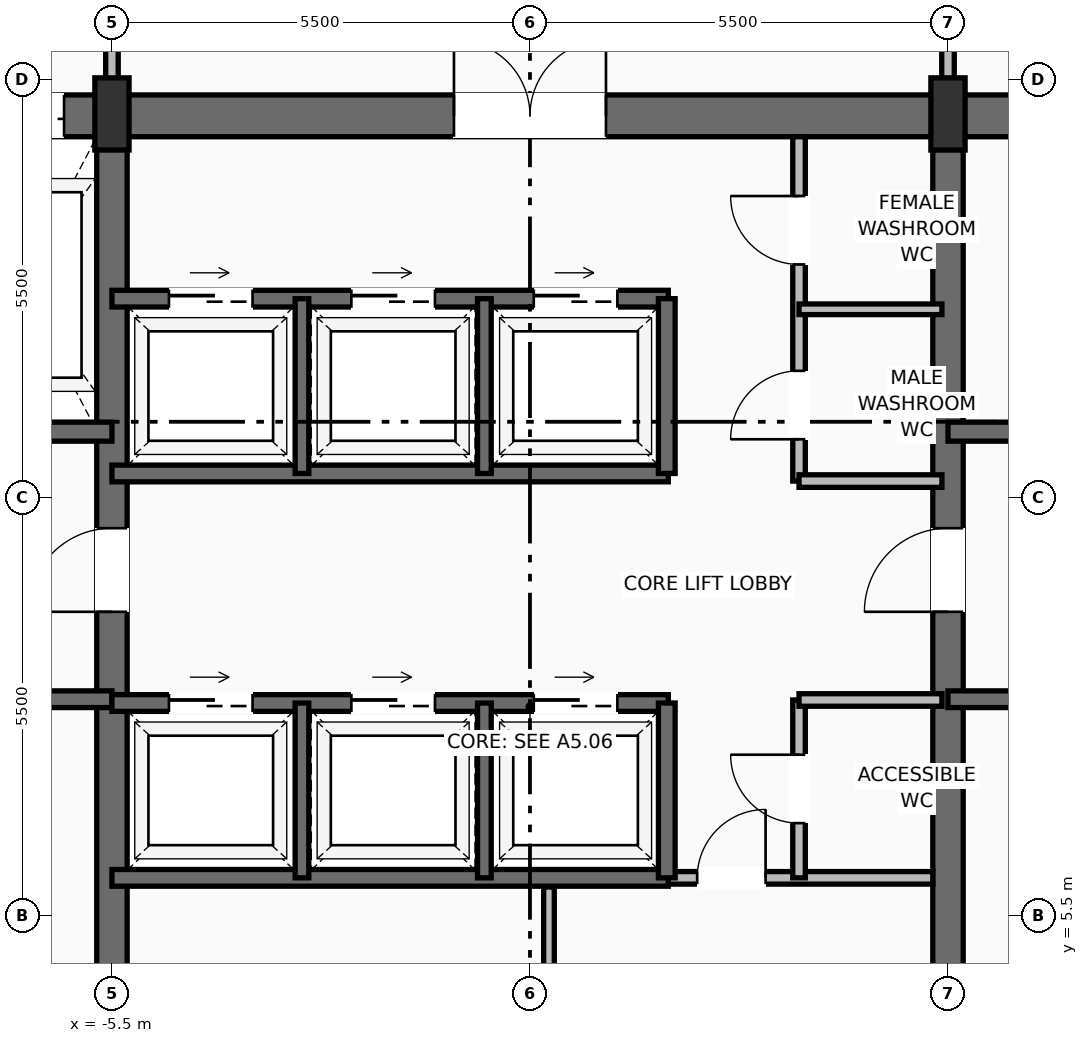
"""IFC4 building model, lengths in metres.
Left out: names, types, materials, properties, quantities, classifications, styles, units other than length and angle.
Written with IfcOpenShell. Run it as: python <this file> out.ifc"""

import sys

from ifc_helpers import new_model, si_unit, direction, frame, frame_2d, origin, origin_2d, place, context, subcontext, project, spatial, rectangle, extrude, source, transform, mapped, element, fill, save


model = new_model("IFC4")
c1 = context("Model", 3, precision=1e-05, world=origin(), true_north=direction((0.0, 1.0)))
c2 = subcontext(c1, "Body", "Model", "MODEL_VIEW")
j1 = project(units=[si_unit("LENGTHUNIT", "METRE"), si_unit("PLANEANGLEUNIT", "RADIAN")], contexts=[c1])
p1 = place(None, origin())
s1 = spatial("IfcSite", under=j1, at=p1, CompositionType="ELEMENT")
p2 = place(p1, origin())
s2 = spatial("IfcBuilding", under=s1, at=p2, CompositionType="ELEMENT")
p3 = place(p2, frame((0.0, 0.0, 215.4)))
s3 = spatial("IfcBuildingStorey", under=s2, at=p3, CompositionType="ELEMENT", Elevation=215.4)
p4 = place(p3, frame((-10.7, 16.025, 0.0), z_axis=(0.0, 0.0, 1.0), x_axis=(1.0, 0.0, 0.0)))
e1 = element("IfcWall", 1, at=p4, inside=s3, PredefinedType="SHEAR", context=c2, shape_type="SweptSolid", body=[
    extrude(rectangle(XDim=21.4, YDim=0.55, at=frame_2d((10.7, 0.0))), origin(), (0.0, 0.0, 1.0), 4.39),
])
p5 = place(p4, frame((3.27, 0.0, 0.0)))
e2 = element("IfcOpeningElement", 2, at=p5, cuts=e1, PredefinedType="OPENING", context=c2, shape_type="SweptSolid", body=[
    extrude(rectangle(XDim=1.3, YDim=2.3, at=frame_2d((0.65, 1.15))), frame((0.0, 0.285, 0.0), z_axis=(0.0, -1.0, 0.0), x_axis=(1.0, 0.0, 0.0)), (0.0, 0.0, 1.0), 0.57),
])
p6 = place(p4, frame((9.7, 0.0, 0.0)))
e3 = element("IfcOpeningElement", 3, at=p6, cuts=e1, PredefinedType="OPENING", context=c2, shape_type="SweptSolid", body=[
    extrude(rectangle(XDim=2.0, YDim=2.4, at=frame_2d((1.0, 1.2))), frame((0.0, 0.285, 0.0), z_axis=(0.0, -1.0, 0.0), x_axis=(1.0, 0.0, 0.0)), (0.0, 0.0, 1.0), 0.57),
])
p7 = place(p3, frame((-5.5, 0.575, 0.0), z_axis=(0.0, 0.0, 1.0), x_axis=(0.0, 1.0, 0.0)))
e4 = element("IfcWall", 4, at=p7, inside=s3, PredefinedType="SHEAR", context=c2, shape_type="SweptSolid", body=[
    extrude(rectangle(XDim=15.45, YDim=0.4, at=frame_2d((7.725, 0.0))), origin(), (0.0, 0.0, 1.0), 4.39),
])
p8 = place(p7, frame((8.925, 0.0, 0.0)))
e5 = element("IfcOpeningElement", 5, at=p8, cuts=e4, PredefinedType="OPENING", context=c2, shape_type="SweptSolid", body=[
    extrude(rectangle(XDim=1.1, YDim=2.2, at=frame_2d((0.55, 1.1))), frame((0.0, 0.21, 0.0), z_axis=(0.0, -1.0, 0.0), x_axis=(1.0, 0.0, 0.0)), (0.0, 0.0, 1.0), 0.42),
])
p9 = place(p3, frame((5.5, 0.575, 0.0), z_axis=(0.0, 0.0, 1.0), x_axis=(0.0, 1.0, 0.0)))
e6 = element("IfcWall", 6, at=p9, inside=s3, PredefinedType="SHEAR", context=c2, shape_type="SweptSolid", body=[
    extrude(rectangle(XDim=15.45, YDim=0.4, at=frame_2d((7.725, 0.0))), origin(), (0.0, 0.0, 1.0), 4.39),
])
p10 = place(p9, frame((8.925, 0.0, 0.0)))
e7 = element("IfcOpeningElement", 7, at=p10, cuts=e6, PredefinedType="OPENING", context=c2, shape_type="SweptSolid", body=[
    extrude(rectangle(XDim=1.1, YDim=2.2, at=frame_2d((0.55, 1.1))), frame((0.0, 0.21, 0.0), z_axis=(0.0, -1.0, 0.0), x_axis=(1.0, 0.0, 0.0)), (0.0, 0.0, 1.0), 0.42),
])
m1 = source(origin(), c2, "Body", "SweptSolid", [
    extrude(rectangle(XDim=0.45, YDim=0.95, at=origin_2d()), origin(), (0.0, 0.0, 1.0), 4.6),
])
for number, where, z_axis, x_axis in (
    (8, (-5.5, 16.05, 0.0), (0.0, 0.0, 1.0), (1.0, 0.0, 0.0)),
    (9, (5.5, 16.05, 0.0), (0.0, 0.0, 1.0), (1.0, 0.0, 0.0)),
):
    element("IfcColumn", number, at=place(p3, frame(where, z_axis=z_axis, x_axis=x_axis)), inside=s3, PredefinedType="PILASTER", context=c2, shape_type="MappedRepresentation", body=[
        mapped(m1, transform((0.0, 0.0, 0.0), scale=1.0)),
    ])
p11 = place(p3, frame((-5.5, 8.35, 0.0), z_axis=(0.0, 0.0, 1.0), x_axis=(-1.0, 0.0, 0.0)))
e10 = element("IfcWall", 10, at=p11, inside=s3, PredefinedType="SOLIDWALL", context=c2, shape_type="SweptSolid", body=[
    extrude(rectangle(XDim=4.65, YDim=0.22, at=frame_2d((2.325, 0.0))), origin(), (0.0, 0.0, 1.0), 4.39),
])
p12 = place(p11, frame((2.5, 0.0, 0.0)))
e11 = element("IfcOpeningElement", 11, at=p12, cuts=e10, PredefinedType="OPENING", context=c2, shape_type="SweptSolid", body=[
    extrude(rectangle(XDim=1.15, YDim=2.2, at=frame_2d((0.575, 1.1))), frame((0.0, 0.12, 0.0), z_axis=(0.0, -1.0, 0.0), x_axis=(1.0, 0.0, 0.0)), (0.0, 0.0, 1.0), 0.24),
])
p13 = place(p3, frame((-5.5, 11.87, 0.0), z_axis=(0.0, 0.0, 1.0), x_axis=(-1.0, 0.0, 0.0)))
e12 = element("IfcWall", 12, at=p13, inside=s3, PredefinedType="SOLIDWALL", context=c2, shape_type="SweptSolid", body=[
    extrude(rectangle(XDim=4.65, YDim=0.25, at=frame_2d((2.325, 0.0))), origin(), (0.0, 0.0, 1.0), 4.39),
])
p14 = place(p13, frame((2.95, 0.0, 0.0)))
e13 = element("IfcOpeningElement", 13, at=p14, cuts=e12, PredefinedType="OPENING", context=c2, shape_type="SweptSolid", body=[
    extrude(rectangle(XDim=1.2, YDim=2.25, at=frame_2d((0.6, 1.125))), frame((0.0, 0.135, 0.0), z_axis=(0.0, -1.0, 0.0), x_axis=(1.0, 0.0, 0.0)), (0.0, 0.0, 1.0), 0.27),
])
p15 = place(p3, frame((10.15, 8.35, 0.0), z_axis=(0.0, 0.0, 1.0), x_axis=(-1.0, 0.0, 0.0)))
e14 = element("IfcWall", 14, at=p15, inside=s3, PredefinedType="SOLIDWALL", context=c2, shape_type="SweptSolid", body=[
    extrude(rectangle(XDim=4.65, YDim=0.22, at=frame_2d((2.325, 0.0))), origin(), (0.0, 0.0, 1.0), 4.39),
])
p16 = place(p15, frame((1.0, 0.0, 0.0)))
e15 = element("IfcOpeningElement", 15, at=p16, cuts=e14, PredefinedType="OPENING", context=c2, shape_type="SweptSolid", body=[
    extrude(rectangle(XDim=1.15, YDim=2.2, at=frame_2d((0.575, 1.1))), frame((0.0, 0.12, 0.0), z_axis=(0.0, -1.0, 0.0), x_axis=(1.0, 0.0, 0.0)), (0.0, 0.0, 1.0), 0.24),
])
p17 = place(p3, frame((10.15, 11.87, 0.0), z_axis=(0.0, 0.0, 1.0), x_axis=(-1.0, 0.0, 0.0)))
e16 = element("IfcWall", 16, at=p17, inside=s3, PredefinedType="SOLIDWALL", context=c2, shape_type="SweptSolid", body=[
    extrude(rectangle(XDim=4.65, YDim=0.25, at=frame_2d((2.325, 0.0))), origin(), (0.0, 0.0, 1.0), 4.39),
])
p18 = place(p17, frame((0.5, 0.0, 0.0)))
e17 = element("IfcOpeningElement", 17, at=p18, cuts=e16, PredefinedType="OPENING", context=c2, shape_type="SweptSolid", body=[
    extrude(rectangle(XDim=1.2, YDim=2.25, at=frame_2d((0.6, 1.125))), frame((0.0, 0.135, 0.0), z_axis=(0.0, -1.0, 0.0), x_axis=(1.0, 0.0, 0.0)), (0.0, 0.0, 1.0), 0.27),
])
p19 = place(p3, frame((1.82, 6.0, 0.0), z_axis=(0.0, 0.0, 1.0), x_axis=(1.0, 0.0, 0.0)))
e18 = element("IfcWall", 18, at=p19, inside=s3, PredefinedType="PARTITIONING", context=c2, shape_type="SweptSolid", body=[
    extrude(rectangle(XDim=3.48, YDim=0.165, at=frame_2d((1.74, 0.0))), origin(), (0.0, 0.0, 1.0), 4.382),
])
p20 = place(p19, frame((0.38, 0.0, 0.0)))
e19 = element("IfcOpeningElement", 19, at=p20, cuts=e18, PredefinedType="OPENING", context=c2, shape_type="SweptSolid", body=[
    extrude(rectangle(XDim=0.9, YDim=2.1, at=frame_2d((0.45, 1.05))), frame((0.0, 0.093, 0.0), z_axis=(0.0, -1.0, 0.0), x_axis=(1.0, 0.0, 0.0)), (0.0, 0.0, 1.0), 0.185),
])
p21 = place(p3, frame((0.25, 0.85, 0.0), z_axis=(0.0, 0.0, 1.0), x_axis=(0.0, 1.0, 0.0)))
e20 = element("IfcWall", 20, at=p21, inside=s3, PredefinedType="PARTITIONING", context=c2, shape_type="SweptSolid", body=[
    extrude(rectangle(XDim=5.03, YDim=0.14, at=frame_2d((2.515, 0.0))), origin(), (0.0, 0.0, 1.0), 4.382),
])
p22 = place(p21, frame((2.1, 0.0, 0.0)))
e21 = element("IfcOpeningElement", 21, at=p22, cuts=e20, PredefinedType="OPENING", context=c2, shape_type="SweptSolid", body=[
    extrude(rectangle(XDim=0.9, YDim=2.1, at=frame_2d((0.45, 1.05))), frame((0.0, 0.08, 0.0), z_axis=(0.0, -1.0, 0.0), x_axis=(1.0, 0.0, 0.0)), (0.0, 0.0, 1.0), 0.16),
])
p23 = place(p3, frame((3.54, 6.0, 0.0), z_axis=(0.0, 0.0, 1.0), x_axis=(0.0, 1.0, 0.0)))
e22 = element("IfcWall", 22, at=p23, inside=s3, PredefinedType="PARTITIONING", context=c2, shape_type="SweptSolid", body=[
    extrude(rectangle(XDim=2.34, YDim=0.165, at=frame_2d((1.17, 0.0))), origin(), (0.0, 0.0, 1.0), 4.382),
])
p24 = place(p23, frame((0.72, 0.0, 0.0)))
e23 = element("IfcOpeningElement", 23, at=p24, cuts=e22, PredefinedType="OPENING", context=c2, shape_type="SweptSolid", body=[
    extrude(rectangle(XDim=0.9, YDim=2.1, at=frame_2d((0.45, 1.05))), frame((0.0, 0.093, 0.0), z_axis=(0.0, -1.0, 0.0), x_axis=(1.0, 0.0, 0.0)), (0.0, 0.0, 1.0), 0.185),
])
p25 = place(p3, frame((3.54, 8.34, 0.0), z_axis=(0.0, 0.0, 1.0), x_axis=(1.0, 0.0, 0.0)))
e24 = element("IfcWall", 24, at=p25, inside=s3, PredefinedType="PARTITIONING", context=c2, shape_type="SweptSolid", body=[
    extrude(rectangle(XDim=1.88, YDim=0.165, at=frame_2d((0.94, 0.0))), origin(), (0.0, 0.0, 1.0), 4.382),
])
p26 = place(p3, frame((-5.5, 6.0, 0.0), z_axis=(0.0, 0.0, 1.0), x_axis=(1.0, 0.0, 0.0)))
e25 = element("IfcWall", 25, at=p26, inside=s3, PredefinedType="SOLIDWALL", context=c2, shape_type="SweptSolid", body=[
    extrude(rectangle(XDim=7.32, YDim=0.22, at=frame_2d((3.66, 0.0))), origin(), (0.0, 0.0, 1.0), 4.39),
])
p27 = place(p3, frame((-5.5, 8.3, 0.0), z_axis=(0.0, 0.0, 1.0), x_axis=(1.0, 0.0, 0.0)))
e26 = element("IfcWall", 26, at=p27, inside=s3, PredefinedType="SOLIDWALL", context=c2, shape_type="SweptSolid", body=[
    extrude(rectangle(XDim=7.32, YDim=0.22, at=frame_2d((3.66, 0.0))), origin(), (0.0, 0.0, 1.0), 4.39),
])
p28 = place(p27, frame((0.75, 0.0, 0.0)))
e27 = element("IfcOpeningElement", 27, at=p28, cuts=e26, PredefinedType="OPENING", context=c2, shape_type="SweptSolid", body=[
    extrude(rectangle(XDim=1.1, YDim=2.2, at=frame_2d((0.55, 1.1))), frame((0.0, 0.12, 0.0), z_axis=(0.0, -1.0, 0.0), x_axis=(1.0, 0.0, 0.0)), (0.0, 0.0, 1.0), 0.24),
])
p29 = place(p27, frame((3.15, 0.0, 0.0)))
e28 = element("IfcOpeningElement", 28, at=p29, cuts=e26, PredefinedType="OPENING", context=c2, shape_type="SweptSolid", body=[
    extrude(rectangle(XDim=1.1, YDim=2.2, at=frame_2d((0.55, 1.1))), frame((0.0, 0.12, 0.0), z_axis=(0.0, -1.0, 0.0), x_axis=(1.0, 0.0, 0.0)), (0.0, 0.0, 1.0), 0.24),
])
p30 = place(p27, frame((5.55, 0.0, 0.0)))
e29 = element("IfcOpeningElement", 29, at=p30, cuts=e26, PredefinedType="OPENING", context=c2, shape_type="SweptSolid", body=[
    extrude(rectangle(XDim=1.1, YDim=2.2, at=frame_2d((0.55, 1.1))), frame((0.0, 0.12, 0.0), z_axis=(0.0, -1.0, 0.0), x_axis=(1.0, 0.0, 0.0)), (0.0, 0.0, 1.0), 0.24),
])
p31 = place(p3, frame((1.8, 6.0, 0.0), z_axis=(0.0, 0.0, 1.0), x_axis=(0.0, 1.0, 0.0)))
e30 = element("IfcWall", 30, at=p31, inside=s3, PredefinedType="SOLIDWALL", context=c2, shape_type="SweptSolid", body=[
    extrude(rectangle(XDim=2.3, YDim=0.22, at=frame_2d((1.15, 0.0))), origin(), (0.0, 0.0, 1.0), 4.39),
])
for number, where, z_axis, x_axis in (
    (31, (-3.0, 6.0, 0.0), (0.0, 0.0, 1.0), (0.0, 1.0, 0.0)),
    (32, (-0.6, 6.0, 0.0), (0.0, 0.0, 1.0), (0.0, 1.0, 0.0)),
):
    element("IfcWall", number, at=place(p3, frame(where, z_axis=z_axis, x_axis=x_axis)), inside=s3, PredefinedType="SOLIDWALL", context=c2, shape_type="SweptSolid", body=[
        extrude(rectangle(XDim=2.3, YDim=0.18, at=frame_2d((1.15, 0.0))), origin(), (0.0, 0.0, 1.0), 4.39),
    ])
p32 = place(p3, frame((-5.5, 11.32, 0.0), z_axis=(0.0, 0.0, 1.0), x_axis=(1.0, 0.0, 0.0)))
e33 = element("IfcWall", 33, at=p32, inside=s3, PredefinedType="SOLIDWALL", context=c2, shape_type="SweptSolid", body=[
    extrude(rectangle(XDim=7.32, YDim=0.22, at=frame_2d((3.66, 0.0))), origin(), (0.0, 0.0, 1.0), 4.39),
])
p33 = place(p3, frame((-5.5, 13.62, 0.0), z_axis=(0.0, 0.0, 1.0), x_axis=(1.0, 0.0, 0.0)))
e34 = element("IfcWall", 34, at=p33, inside=s3, PredefinedType="SOLIDWALL", context=c2, shape_type="SweptSolid", body=[
    extrude(rectangle(XDim=7.32, YDim=0.22, at=frame_2d((3.66, 0.0))), origin(), (0.0, 0.0, 1.0), 4.39),
])
p34 = place(p33, frame((0.75, 0.0, 0.0)))
e35 = element("IfcOpeningElement", 35, at=p34, cuts=e34, PredefinedType="OPENING", context=c2, shape_type="SweptSolid", body=[
    extrude(rectangle(XDim=1.1, YDim=2.2, at=frame_2d((0.55, 1.1))), frame((0.0, 0.12, 0.0), z_axis=(0.0, -1.0, 0.0), x_axis=(1.0, 0.0, 0.0)), (0.0, 0.0, 1.0), 0.24),
])
p35 = place(p33, frame((3.15, 0.0, 0.0)))
e36 = element("IfcOpeningElement", 36, at=p35, cuts=e34, PredefinedType="OPENING", context=c2, shape_type="SweptSolid", body=[
    extrude(rectangle(XDim=1.1, YDim=2.2, at=frame_2d((0.55, 1.1))), frame((0.0, 0.12, 0.0), z_axis=(0.0, -1.0, 0.0), x_axis=(1.0, 0.0, 0.0)), (0.0, 0.0, 1.0), 0.24),
])
p36 = place(p33, frame((5.55, 0.0, 0.0)))
e37 = element("IfcOpeningElement", 37, at=p36, cuts=e34, PredefinedType="OPENING", context=c2, shape_type="SweptSolid", body=[
    extrude(rectangle(XDim=1.1, YDim=2.2, at=frame_2d((0.55, 1.1))), frame((0.0, 0.12, 0.0), z_axis=(0.0, -1.0, 0.0), x_axis=(1.0, 0.0, 0.0)), (0.0, 0.0, 1.0), 0.24),
])
p37 = place(p3, frame((1.8, 11.32, 0.0), z_axis=(0.0, 0.0, 1.0), x_axis=(0.0, 1.0, 0.0)))
e38 = element("IfcWall", 38, at=p37, inside=s3, PredefinedType="SOLIDWALL", context=c2, shape_type="SweptSolid", body=[
    extrude(rectangle(XDim=2.3, YDim=0.22, at=frame_2d((1.15, 0.0))), origin(), (0.0, 0.0, 1.0), 4.39),
])
for number, where, z_axis, x_axis in (
    (39, (-3.0, 11.32, 0.0), (0.0, 0.0, 1.0), (0.0, 1.0, 0.0)),
    (40, (-0.6, 11.32, 0.0), (0.0, 0.0, 1.0), (0.0, 1.0, 0.0)),
):
    element("IfcWall", number, at=place(p3, frame(where, z_axis=z_axis, x_axis=x_axis)), inside=s3, PredefinedType="SOLIDWALL", context=c2, shape_type="SweptSolid", body=[
        extrude(rectangle(XDim=2.3, YDim=0.18, at=frame_2d((1.15, 0.0))), origin(), (0.0, 0.0, 1.0), 4.39),
    ])
p38 = place(p3, frame((3.54, 11.22, 0.0), z_axis=(0.0, 0.0, 1.0), x_axis=(0.0, 1.0, 0.0)))
e41 = element("IfcWall", 41, at=p38, inside=s3, PredefinedType="PARTITIONING", context=c2, shape_type="SweptSolid", body=[
    extrude(rectangle(XDim=4.53, YDim=0.165, at=frame_2d((2.265, 0.0))), origin(), (0.0, 0.0, 1.0), 4.382),
])
p39 = place(p38, frame((0.55, 0.0, 0.0)))
e42 = element("IfcOpeningElement", 42, at=p39, cuts=e41, PredefinedType="OPENING", context=c2, shape_type="SweptSolid", body=[
    extrude(rectangle(XDim=0.9, YDim=2.1, at=frame_2d((0.45, 1.05))), frame((0.0, 0.093, 0.0), z_axis=(0.0, -1.0, 0.0), x_axis=(1.0, 0.0, 0.0)), (0.0, 0.0, 1.0), 0.185),
])
p40 = place(p38, frame((2.85, 0.0, 0.0)))
e43 = element("IfcOpeningElement", 43, at=p40, cuts=e41, PredefinedType="OPENING", context=c2, shape_type="SweptSolid", body=[
    extrude(rectangle(XDim=0.9, YDim=2.1, at=frame_2d((0.45, 1.05))), frame((0.0, 0.093, 0.0), z_axis=(0.0, -1.0, 0.0), x_axis=(1.0, 0.0, 0.0)), (0.0, 0.0, 1.0), 0.185),
])
p41 = place(p3, frame((3.54, 11.22, 0.0), z_axis=(0.0, 0.0, 1.0), x_axis=(1.0, 0.0, 0.0)))
e44 = element("IfcWall", 44, at=p41, inside=s3, PredefinedType="PARTITIONING", context=c2, shape_type="SweptSolid", body=[
    extrude(rectangle(XDim=1.88, YDim=0.165, at=frame_2d((0.94, 0.0))), origin(), (0.0, 0.0, 1.0), 4.382),
])
p42 = place(p3, frame((3.54, 13.48, 0.0), z_axis=(0.0, 0.0, 1.0), x_axis=(1.0, 0.0, 0.0)))
e45 = element("IfcWall", 45, at=p42, inside=s3, PredefinedType="PARTITIONING", context=c2, shape_type="SweptSolid", body=[
    extrude(rectangle(XDim=1.88, YDim=0.14, at=frame_2d((0.94, 0.0))), origin(), (0.0, 0.0, 1.0), 4.382),
])
p43 = place(p3, frame((-5.5, 16.32, 0.0), z_axis=(0.0, 0.0, 1.0), x_axis=(0.0, 1.0, 0.0)))
e46 = element("IfcWall", 46, at=p43, inside=s3, PredefinedType="PARTITIONING", context=c2, shape_type="SweptSolid", body=[
    extrude(rectangle(XDim=23.493, YDim=0.165, at=frame_2d((11.747, 0.0))), origin(), (0.0, 0.0, 1.0), 3.833),
])
p44 = place(p43, frame((5.293, 0.0, 0.0)))
e47 = element("IfcOpeningElement", 47, at=p44, cuts=e46, PredefinedType="OPENING", context=c2, shape_type="SweptSolid", body=[
    extrude(rectangle(XDim=1.5, YDim=2.25, at=frame_2d((0.75, 1.125))), frame((0.0, 0.093, 0.0), z_axis=(0.0, -1.0, 0.0), x_axis=(1.0, 0.0, 0.0)), (0.0, 0.0, 1.0), 0.185),
])
p45 = place(p3, frame((5.5, 16.32, 0.0), z_axis=(0.0, 0.0, 1.0), x_axis=(0.0, 1.0, 0.0)))
e48 = element("IfcWall", 48, at=p45, inside=s3, PredefinedType="PARTITIONING", context=c2, shape_type="SweptSolid", body=[
    extrude(rectangle(XDim=21.902, YDim=0.165, at=frame_2d((10.951, 0.0))), origin(), (0.0, 0.0, 1.0), 3.833),
])
p46 = place(p45, frame((4.896, 0.0, 0.0)))
e49 = element("IfcOpeningElement", 49, at=p46, cuts=e48, PredefinedType="OPENING", context=c2, shape_type="SweptSolid", body=[
    extrude(rectangle(XDim=1.5, YDim=2.25, at=frame_2d((0.75, 1.125))), frame((0.0, 0.093, 0.0), z_axis=(0.0, -1.0, 0.0), x_axis=(1.0, 0.0, 0.0)), (0.0, 0.0, 1.0), 0.185),
])
m2 = source(origin(), c2, "Body", "SweptSolid", [
    extrude(rectangle(XDim=1.1, YDim=2.2, at=frame_2d((0.55, 1.1))), frame((0.0, 0.025, 0.0), z_axis=(0.0, -1.0, 0.0), x_axis=(1.0, 0.0, 0.0)), (0.0, 0.0, 1.0), 0.05),
])
p47 = place(p8, origin())
e50 = element("IfcDoor", 50, at=p47, inside=s3, OperationType="SINGLE_SWING_LEFT", PredefinedType="DOOR", context=c2, shape_type="MappedRepresentation", body=[
    mapped(m2, transform((0.0, 0.0, 0.0), scale=1.0)),
])
fill(e5, e50)
m3 = source(origin(), c2, "Body", "SweptSolid", [
    extrude(rectangle(XDim=1.3, YDim=2.3, at=frame_2d((0.65, 1.15))), frame((0.0, 0.025, 0.0), z_axis=(0.0, -1.0, 0.0), x_axis=(1.0, 0.0, 0.0)), (0.0, 0.0, 1.0), 0.05),
])
p48 = place(p5, origin())
e51 = element("IfcDoor", 51, at=p48, inside=s3, OperationType="SLIDING_TO_RIGHT", PredefinedType="DOOR", context=c2, shape_type="MappedRepresentation", body=[
    mapped(m3, transform((0.0, 0.0, 0.0), scale=1.0)),
])
fill(e2, e51)
p49 = place(p10, origin())
e52 = element("IfcDoor", 52, at=p49, inside=s3, OperationType="SINGLE_SWING_LEFT", PredefinedType="DOOR", context=c2, shape_type="MappedRepresentation", body=[
    mapped(m2, transform((0.0, 0.0, 0.0), scale=1.0)),
])
fill(e7, e52)
m4 = source(origin(), c2, "Body", "SweptSolid", [
    extrude(rectangle(XDim=2.0, YDim=2.4, at=frame_2d((1.0, 1.2))), frame((0.0, 0.025, 0.0), z_axis=(0.0, -1.0, 0.0), x_axis=(1.0, 0.0, 0.0)), (0.0, 0.0, 1.0), 0.05),
])
p50 = place(p6, origin())
e53 = element("IfcDoor", 53, at=p50, inside=s3, OperationType="DOUBLE_DOOR_SINGLE_SWING", PredefinedType="DOOR", context=c2, shape_type="MappedRepresentation", body=[
    mapped(m4, transform((0.0, 0.0, 0.0), scale=1.0)),
])
fill(e3, e53)
m5 = source(origin(), c2, "Body", "SweptSolid", [
    extrude(rectangle(XDim=0.9, YDim=2.1, at=frame_2d((0.45, 1.05))), frame((0.0, 0.025, 0.0), z_axis=(0.0, -1.0, 0.0), x_axis=(1.0, 0.0, 0.0)), (0.0, 0.0, 1.0), 0.05),
])
p51 = place(p20, origin())
e54 = element("IfcDoor", 54, at=p51, inside=s3, OperationType="SINGLE_SWING_RIGHT", PredefinedType="DOOR", context=c2, shape_type="MappedRepresentation", body=[
    mapped(m5, transform((0.0, 0.0, 0.0), scale=1.0)),
])
fill(e19, e54)
p52 = place(p24, origin())
e55 = element("IfcDoor", 55, at=p52, inside=s3, OperationType="SINGLE_SWING_RIGHT", PredefinedType="DOOR", context=c2, shape_type="MappedRepresentation", body=[
    mapped(m5, transform((0.0, 0.0, 0.0), scale=1.0)),
])
fill(e23, e55)
m6 = source(origin(), c2, "Body", "SweptSolid", [
    extrude(rectangle(XDim=1.1, YDim=2.2, at=frame_2d((0.55, 1.1))), frame((0.0, 0.025, 0.0), z_axis=(0.0, -1.0, 0.0), x_axis=(1.0, 0.0, 0.0)), (0.0, 0.0, 1.0), 0.05),
])
p53 = place(p28, origin())
e56 = element("IfcDoor", 56, at=p53, inside=s3, OperationType="SLIDING_TO_LEFT", PredefinedType="DOOR", context=c2, shape_type="MappedRepresentation", body=[
    mapped(m6, transform((0.0, 0.0, 0.0), scale=1.0)),
])
fill(e27, e56)
p54 = place(p29, origin())
e57 = element("IfcDoor", 57, at=p54, inside=s3, OperationType="SLIDING_TO_LEFT", PredefinedType="DOOR", context=c2, shape_type="MappedRepresentation", body=[
    mapped(m6, transform((0.0, 0.0, 0.0), scale=1.0)),
])
fill(e28, e57)
p55 = place(p30, origin())
e58 = element("IfcDoor", 58, at=p55, inside=s3, OperationType="SLIDING_TO_LEFT", PredefinedType="DOOR", context=c2, shape_type="MappedRepresentation", body=[
    mapped(m6, transform((0.0, 0.0, 0.0), scale=1.0)),
])
fill(e29, e58)
p56 = place(p34, origin())
e59 = element("IfcDoor", 59, at=p56, inside=s3, OperationType="SLIDING_TO_RIGHT", PredefinedType="DOOR", context=c2, shape_type="MappedRepresentation", body=[
    mapped(m6, transform((0.0, 0.0, 0.0), scale=1.0)),
])
fill(e35, e59)
p57 = place(p35, origin())
e60 = element("IfcDoor", 60, at=p57, inside=s3, OperationType="SLIDING_TO_RIGHT", PredefinedType="DOOR", context=c2, shape_type="MappedRepresentation", body=[
    mapped(m6, transform((0.0, 0.0, 0.0), scale=1.0)),
])
fill(e36, e60)
p58 = place(p36, origin())
e61 = element("IfcDoor", 61, at=p58, inside=s3, OperationType="SLIDING_TO_RIGHT", PredefinedType="DOOR", context=c2, shape_type="MappedRepresentation", body=[
    mapped(m6, transform((0.0, 0.0, 0.0), scale=1.0)),
])
fill(e37, e61)
p59 = place(p39, origin())
e62 = element("IfcDoor", 62, at=p59, inside=s3, OperationType="SINGLE_SWING_LEFT", PredefinedType="DOOR", context=c2, shape_type="MappedRepresentation", body=[
    mapped(m5, transform((0.0, 0.0, 0.0), scale=1.0)),
])
fill(e42, e62)
p60 = place(p40, origin())
e63 = element("IfcDoor", 63, at=p60, inside=s3, OperationType="SINGLE_SWING_RIGHT", PredefinedType="DOOR", context=c2, shape_type="MappedRepresentation", body=[
    mapped(m5, transform((0.0, 0.0, 0.0), scale=1.0)),
])
fill(e43, e63)
save(model, sys.argv[1])
